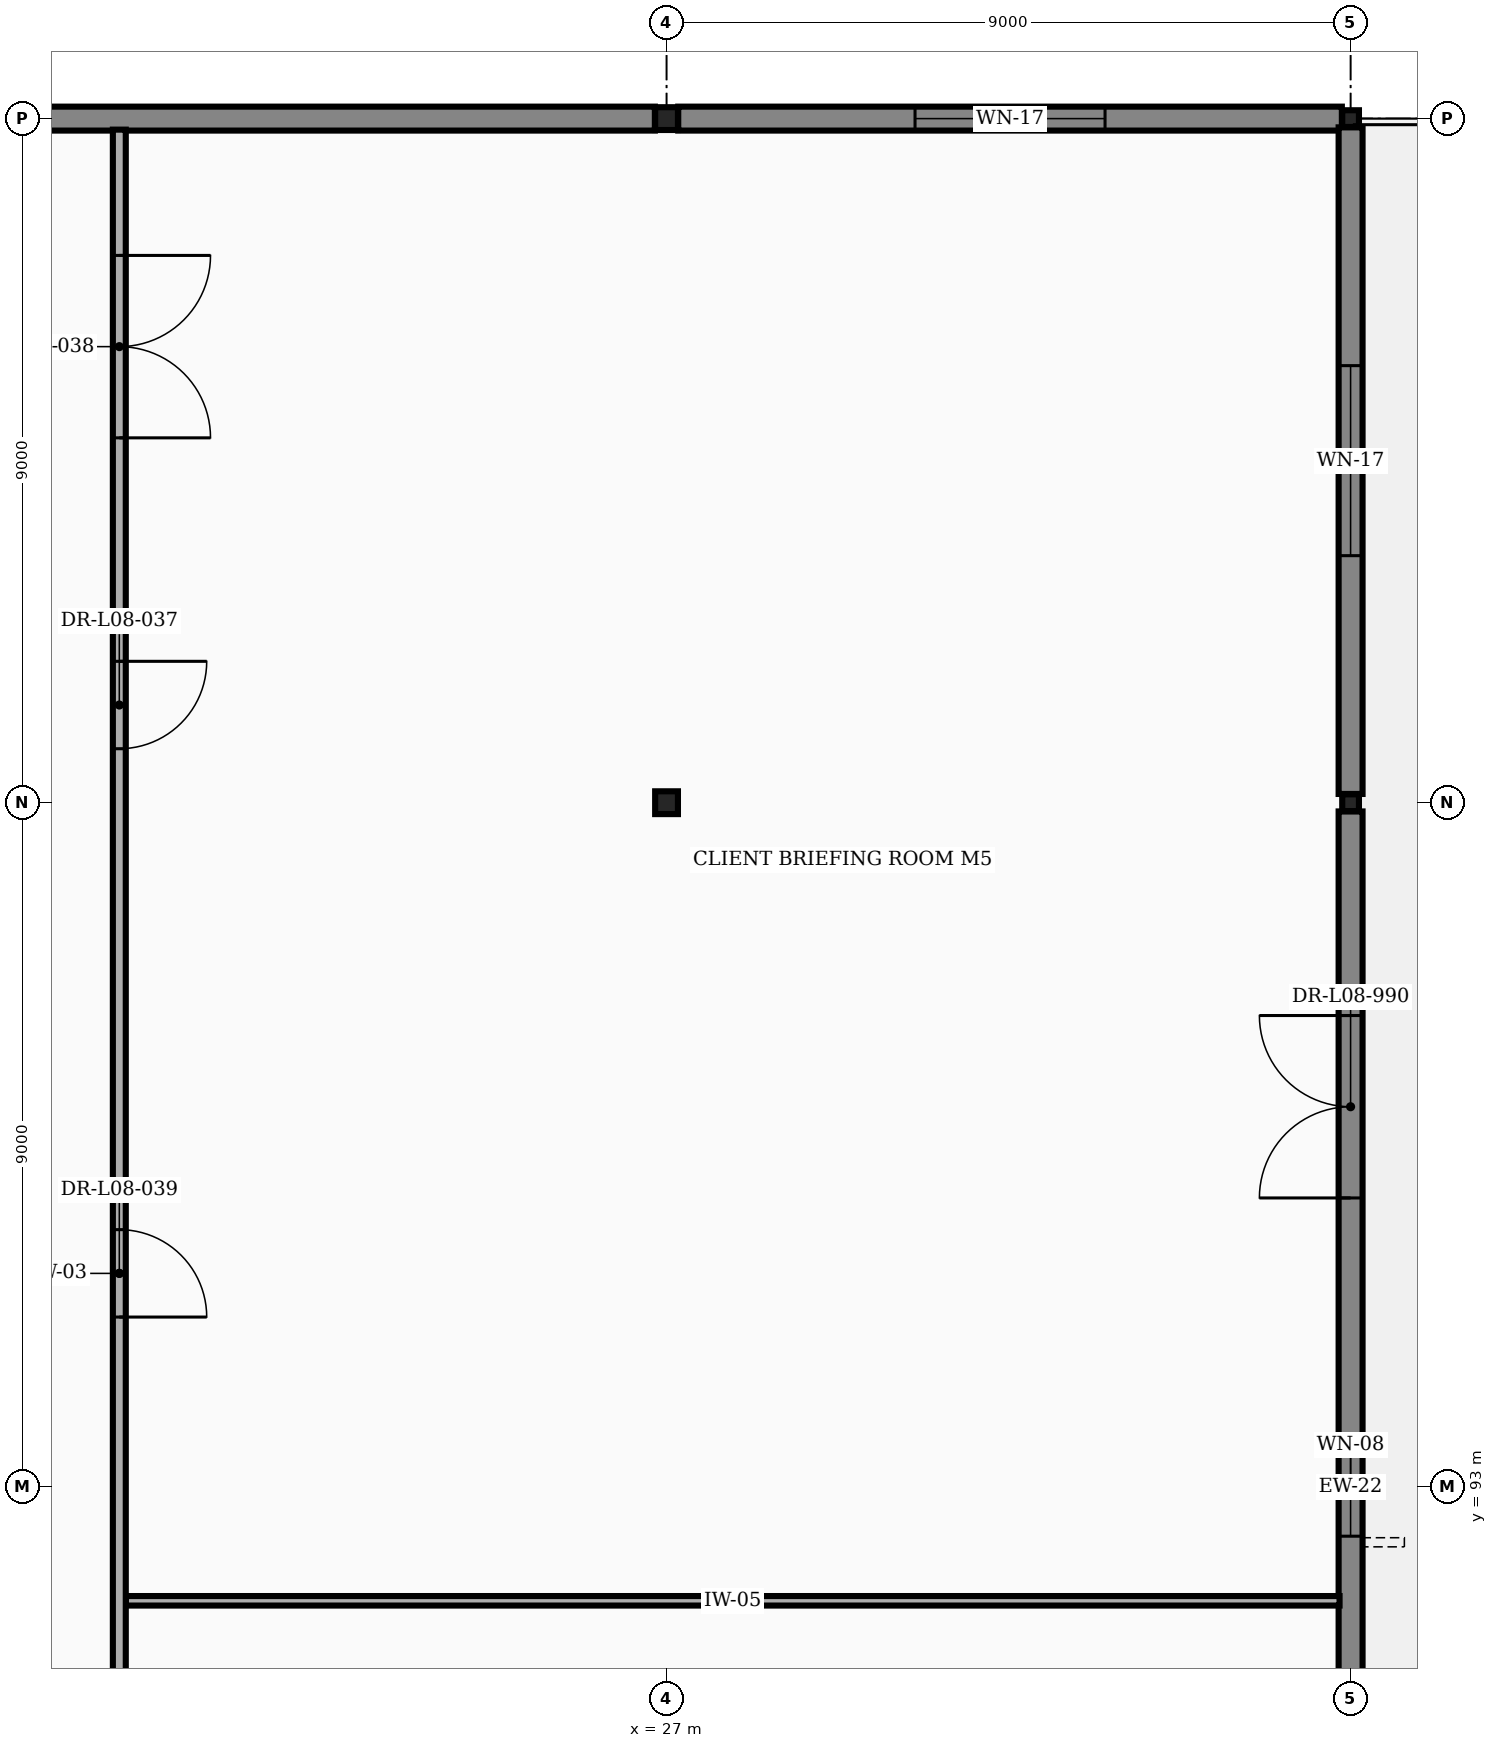
"""IFC4 building model, lengths in metres.
Left out: names, types, materials, properties, quantities, classifications, styles, units other than length and angle.
Written with IfcOpenShell. Run it as: python <this file> out.ifc"""

import sys

from ifc_helpers import new_model, si_unit, direction, frame, frame_2d, origin, origin_2d, place, context, subcontext, project, spatial, rectangle, hollow_rectangle, extrude, element, fill, save


model = new_model("IFC4")
c1 = context("Model", 3, precision=1e-05, world=origin(), true_north=direction((0.0, 1.0)))
c2 = subcontext(c1, "Body", "Model", "MODEL_VIEW")
j1 = project(units=[si_unit("LENGTHUNIT", "METRE"), si_unit("PLANEANGLEUNIT", "RADIAN")], contexts=[c1])
p1 = place(None, origin())
s1 = spatial("IfcSite", under=j1, at=p1, CompositionType="ELEMENT")
p2 = place(p1, origin())
s2 = spatial("IfcBuilding", under=s1, at=p2, CompositionType="ELEMENT")
p3 = place(p2, frame((0.0, 0.0, 37.8)))
s3 = spatial("IfcBuildingStorey", under=s2, at=p3, CompositionType="ELEMENT", Elevation=37.8)
for number, where, z_axis, x_axis in (
    (1, (27.0, 102.0, 0.0), (0.0, 0.0, 1.0), (1.0, 0.0, 0.0)),
    (2, (27.0, 111.0, 0.0), (0.0, 0.0, 1.0), (1.0, 0.0, 0.0)),
):
    element("IfcColumn", number, at=place(p3, frame(where, z_axis=z_axis, x_axis=x_axis)), inside=s3, PredefinedType="COLUMN", context=c2, shape_type="SweptSolid", body=[
        extrude(hollow_rectangle(XDim=0.3, YDim=0.3, WallThickness=0.012, at=origin_2d()), origin(), (0.0, 0.0, 1.0), 3.9),
    ])
for number, where, z_axis, x_axis in (
    (3, (36.0, 102.0, 0.0), (0.0, 0.0, 1.0), (1.0, 0.0, 0.0)),
    (4, (36.0, 111.0, 0.0), (0.0, 0.0, 1.0), (1.0, 0.0, 0.0)),
):
    element("IfcColumn", number, at=place(p3, frame(where, z_axis=z_axis, x_axis=x_axis)), inside=s3, PredefinedType="COLUMN", context=c2, shape_type="SweptSolid", body=[
        extrude(hollow_rectangle(XDim=0.22, YDim=0.22, WallThickness=0.01, at=origin_2d()), origin(), (0.0, 0.0, 1.0), 3.9),
    ])
p4 = place(p3, frame((9.154, 111.0, 0.0), z_axis=(0.0, 0.0, 1.0), x_axis=(1.0, 0.0, 0.0)))
e5 = element("IfcWall", 5, at=p4, inside=s3, PredefinedType="STANDARD", context=c2, shape_type="SweptSolid", body=[
    extrude(rectangle(XDim=17.692, YDim=0.315, at=frame_2d((8.846, 0.0))), origin(), (0.0, 0.0, 1.0), 2.803),
])
p5 = place(p4, frame((8.196, 0.0, 0.7)))
e6 = element("IfcOpeningElement", 6, at=p5, cuts=e5, PredefinedType="OPENING", context=c2, shape_type="SweptSolid", body=[
    extrude(rectangle(XDim=1.3, YDim=1.9, at=frame_2d((0.65, 0.95))), frame((0.0, 0.169, 0.0), z_axis=(0.0, -1.0, 0.0), x_axis=(1.0, 0.0, 0.0)), (0.0, 0.0, 1.0), 0.339),
])
p6 = place(p3, frame((27.154, 111.0, 0.0), z_axis=(0.0, 0.0, 1.0), x_axis=(1.0, 0.0, 0.0)))
e7 = element("IfcWall", 7, at=p6, inside=s3, PredefinedType="STANDARD", context=c2, shape_type="SweptSolid", body=[
    extrude(rectangle(XDim=8.731, YDim=0.315, at=frame_2d((4.366, 0.0))), origin(), (0.0, 0.0, 1.0), 3.565),
])
p7 = place(p6, frame((3.115, 0.0, 0.7)))
e8 = element("IfcOpeningElement", 8, at=p7, cuts=e7, PredefinedType="OPENING", context=c2, shape_type="SweptSolid", body=[
    extrude(rectangle(XDim=2.5, YDim=1.9, at=frame_2d((1.25, 0.95))), frame((0.0, 0.169, 0.0), z_axis=(0.0, -1.0, 0.0), x_axis=(1.0, 0.0, 0.0)), (0.0, 0.0, 1.0), 0.339),
])
p8 = place(p3, frame((36.0, 84.115, 0.0), z_axis=(0.0, 0.0, 1.0), x_axis=(0.0, 1.0, 0.0)))
e9 = element("IfcWall", 9, at=p8, inside=s3, PredefinedType="STANDARD", context=c2, shape_type="SweptSolid", body=[
    extrude(rectangle(XDim=17.77, YDim=0.315, at=frame_2d((8.885, 0.0))), origin(), (0.0, 0.0, 1.0), 2.953),
])
p9 = place(p8, frame((8.235, 0.0, 0.7)))
e10 = element("IfcOpeningElement", 10, at=p9, cuts=e9, PredefinedType="OPENING", context=c2, shape_type="SweptSolid", body=[
    extrude(rectangle(XDim=1.3, YDim=1.9, at=frame_2d((0.65, 0.95))), frame((0.0, 0.169, 0.0), z_axis=(0.0, -1.0, 0.0), x_axis=(1.0, 0.0, 0.0)), (0.0, 0.0, 1.0), 0.339),
])
p10 = place(p8, frame((12.685, 0.0, 0.0)))
e11 = element("IfcOpeningElement", 11, at=p10, cuts=e9, PredefinedType="OPENING", context=c2, shape_type="SweptSolid", body=[
    extrude(rectangle(XDim=2.4, YDim=2.35, at=frame_2d((1.2, 1.175))), frame((0.0, 0.169, 0.0), z_axis=(0.0, -1.0, 0.0), x_axis=(1.0, 0.0, 0.0)), (0.0, 0.0, 1.0), 0.339),
])
p11 = place(p3, frame((36.0, 102.115, 0.0), z_axis=(0.0, 0.0, 1.0), x_axis=(0.0, 1.0, 0.0)))
e12 = element("IfcWall", 12, at=p11, inside=s3, PredefinedType="STANDARD", context=c2, shape_type="SweptSolid", body=[
    extrude(rectangle(XDim=8.77, YDim=0.315, at=frame_2d((4.385, 0.0))), origin(), (0.0, 0.0, 1.0), 3.565),
])
p12 = place(p11, frame((3.135, 0.0, 0.7)))
e13 = element("IfcOpeningElement", 13, at=p12, cuts=e12, PredefinedType="OPENING", context=c2, shape_type="SweptSolid", body=[
    extrude(rectangle(XDim=2.5, YDim=1.9, at=frame_2d((1.25, 0.95))), frame((0.0, 0.169, 0.0), z_axis=(0.0, -1.0, 0.0), x_axis=(1.0, 0.0, 0.0)), (0.0, 0.0, 1.0), 0.339),
])
p13 = place(p3, frame((19.885, 91.5, 0.0), z_axis=(0.0, 0.0, 1.0), x_axis=(1.0, 0.0, 0.0)))
e14 = element("IfcWall", 14, at=p13, inside=s3, PredefinedType="PARTITIONING", context=c2, shape_type="SweptSolid", body=[
    extrude(rectangle(XDim=15.97, YDim=0.125, at=frame_2d((7.985, 0.0))), origin(), (0.0, 0.0, 1.0), 3.565),
])
p14 = place(p3, frame((19.8, 80.76, 0.0), z_axis=(0.0, 0.0, 1.0), x_axis=(0.0, 1.0, 0.0)))
e15 = element("IfcWall", 15, at=p14, inside=s3, PredefinedType="PARTITIONING", context=c2, shape_type="SweptSolid", body=[
    extrude(rectangle(XDim=30.095, YDim=0.17, at=frame_2d((15.047, 0.0))), origin(), (0.0, 0.0, 1.0), 3.565),
])
p15 = place(p14, frame((0.35, 0.0, 0.0)))
e16 = element("IfcOpeningElement", 16, at=p15, cuts=e15, PredefinedType="OPENING", context=c2, shape_type="SweptSolid", body=[
    extrude(rectangle(XDim=1.0, YDim=2.15, at=frame_2d((0.5, 1.075))), frame((0.0, 0.097, 0.0), z_axis=(0.0, -1.0, 0.0), x_axis=(1.0, 0.0, 0.0)), (0.0, 0.0, 1.0), 0.194),
])
p16 = place(p14, frame((21.95, 0.0, 0.0)))
e17 = element("IfcOpeningElement", 17, at=p16, cuts=e15, PredefinedType="OPENING", context=c2, shape_type="SweptSolid", body=[
    extrude(rectangle(XDim=1.15, YDim=2.15, at=frame_2d((0.575, 1.075))), frame((0.0, 0.097, 0.0), z_axis=(0.0, -1.0, 0.0), x_axis=(1.0, 0.0, 0.0)), (0.0, 0.0, 1.0), 0.194),
])
p17 = place(p14, frame((26.04, 0.0, 0.0)))
e18 = element("IfcOpeningElement", 18, at=p17, cuts=e15, PredefinedType="OPENING", context=c2, shape_type="SweptSolid", body=[
    extrude(rectangle(XDim=2.4, YDim=2.35, at=frame_2d((1.2, 1.175))), frame((0.0, 0.097, 0.0), z_axis=(0.0, -1.0, 0.0), x_axis=(1.0, 0.0, 0.0)), (0.0, 0.0, 1.0), 0.194),
])
p18 = place(p14, frame((14.473, 0.0, 0.0)))
e19 = element("IfcOpeningElement", 19, at=p18, cuts=e15, PredefinedType="OPENING", context=c2, shape_type="SweptSolid", body=[
    extrude(rectangle(XDim=1.15, YDim=2.15, at=frame_2d((0.575, 1.075))), frame((0.0, 0.097, 0.0), z_axis=(0.0, -1.0, 0.0), x_axis=(1.0, 0.0, 0.0)), (0.0, 0.0, 1.0), 0.194),
])
p19 = place(p7, origin())
e20 = element("IfcWindow", 20, at=p19, inside=s3, PartitioningType="SINGLE_PANEL", PredefinedType="WINDOW", context=c2, shape_type="SweptSolid", body=[
    extrude(rectangle(XDim=2.5, YDim=1.9, at=frame_2d((1.25, 0.95))), frame((0.0, 0.03, 0.0), z_axis=(0.0, -1.0, 0.0), x_axis=(1.0, 0.0, 0.0)), (0.0, 0.0, 1.0), 0.06),
])
fill(e8, e20)
p20 = place(p9, origin())
e21 = element("IfcWindow", 21, at=p20, inside=s3, PartitioningType="SINGLE_PANEL", PredefinedType="WINDOW", context=c2, shape_type="SweptSolid", body=[
    extrude(rectangle(XDim=1.3, YDim=1.9, at=frame_2d((0.65, 0.95))), frame((0.0, 0.03, 0.0), z_axis=(0.0, -1.0, 0.0), x_axis=(1.0, 0.0, 0.0)), (0.0, 0.0, 1.0), 0.06),
])
fill(e10, e21)
p21 = place(p12, origin())
e22 = element("IfcWindow", 22, at=p21, inside=s3, PartitioningType="SINGLE_PANEL", PredefinedType="WINDOW", context=c2, shape_type="SweptSolid", body=[
    extrude(rectangle(XDim=2.5, YDim=1.9, at=frame_2d((1.25, 0.95))), frame((0.0, 0.03, 0.0), z_axis=(0.0, -1.0, 0.0), x_axis=(1.0, 0.0, 0.0)), (0.0, 0.0, 1.0), 0.06),
])
fill(e13, e22)
p22 = place(p10, origin())
e23 = element("IfcDoor", 23, at=p22, inside=s3, OperationType="DOUBLE_DOOR_SINGLE_SWING", PredefinedType="DOOR", context=c2, shape_type="SweptSolid", body=[
    extrude(rectangle(XDim=2.4, YDim=2.35, at=frame_2d((1.2, 1.175))), frame((0.0, 0.025, 0.0), z_axis=(0.0, -1.0, 0.0), x_axis=(1.0, 0.0, 0.0)), (0.0, 0.0, 1.0), 0.05),
])
fill(e11, e23)
p23 = place(p16, frame((1.15, 0.0, 0.0), z_axis=(0.0, 0.0, 1.0), x_axis=(-1.0, 0.0, 0.0)))
e24 = element("IfcDoor", 24, at=p23, inside=s3, OperationType="SINGLE_SWING_LEFT", PredefinedType="DOOR", context=c2, shape_type="SweptSolid", body=[
    extrude(rectangle(XDim=1.15, YDim=2.15, at=frame_2d((0.575, 1.075))), frame((0.0, 0.025, 0.0), z_axis=(0.0, -1.0, 0.0), x_axis=(1.0, 0.0, 0.0)), (0.0, 0.0, 1.0), 0.05),
])
fill(e17, e24)
p24 = place(p17, frame((2.4, 0.0, 0.0), z_axis=(0.0, 0.0, 1.0), x_axis=(-1.0, 0.0, 0.0)))
e25 = element("IfcDoor", 25, at=p24, inside=s3, OperationType="DOUBLE_DOOR_SINGLE_SWING", PredefinedType="DOOR", context=c2, shape_type="SweptSolid", body=[
    extrude(rectangle(XDim=2.4, YDim=2.35, at=frame_2d((1.2, 1.175))), frame((0.0, 0.025, 0.0), z_axis=(0.0, -1.0, 0.0), x_axis=(1.0, 0.0, 0.0)), (0.0, 0.0, 1.0), 0.05),
])
fill(e18, e25)
p25 = place(p18, frame((1.15, 0.0, 0.0), z_axis=(0.0, 0.0, 1.0), x_axis=(-1.0, 0.0, 0.0)))
e26 = element("IfcDoor", 26, at=p25, inside=s3, OperationType="SINGLE_SWING_RIGHT", PredefinedType="DOOR", context=c2, shape_type="SweptSolid", body=[
    extrude(rectangle(XDim=1.15, YDim=2.15, at=frame_2d((0.575, 1.075))), frame((0.0, 0.025, 0.0), z_axis=(0.0, -1.0, 0.0), x_axis=(1.0, 0.0, 0.0)), (0.0, 0.0, 1.0), 0.05),
])
fill(e19, e26)
save(model, sys.argv[1])
